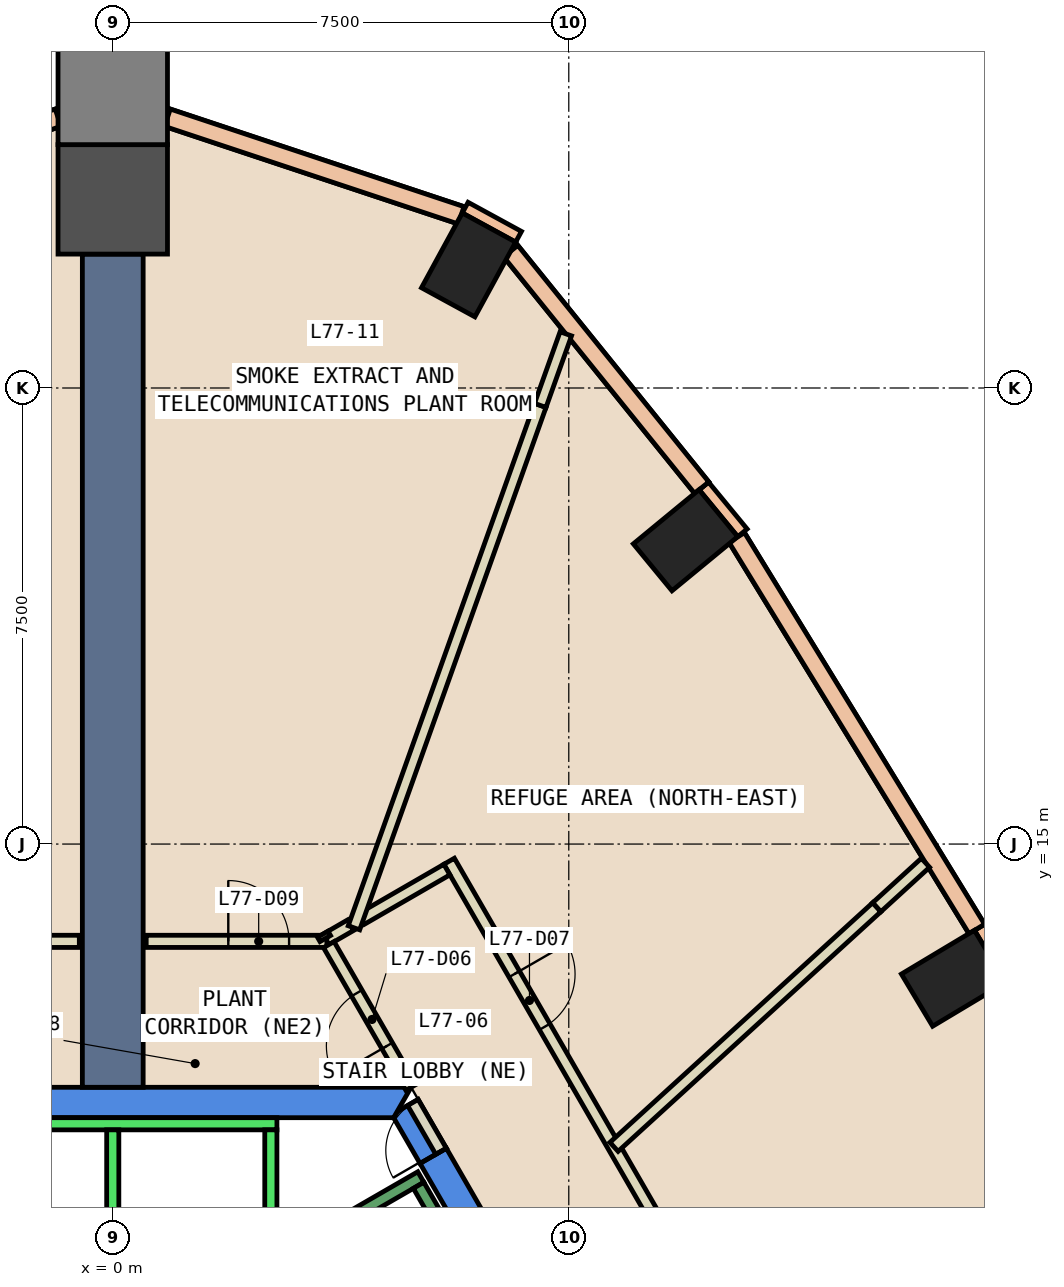
"""IFC4 building model, lengths in metres.
Left out: names, types, materials, properties, quantities, classifications, styles, units other than length and angle.
Written with IfcOpenShell. Run it as: python <this file> out.ifc"""

import sys

from ifc_helpers import new_model, si_unit, direction, frame, frame_2d, origin, origin_2d, place, context, subcontext, project, spatial, polyline, rectangle, outline, extrude, element, fill, save


model = new_model("IFC4")
c1 = context("Model", 3, precision=1e-05, world=origin(), true_north=direction((0.0, 1.0)))
c2 = subcontext(c1, "Body", "Model", "MODEL_VIEW")
j1 = project(units=[si_unit("LENGTHUNIT", "METRE"), si_unit("PLANEANGLEUNIT", "RADIAN")], contexts=[c1])
p1 = place(None, origin())
s1 = spatial("IfcSite", under=j1, at=p1, CompositionType="ELEMENT")
p2 = place(p1, origin())
s2 = spatial("IfcBuilding", under=s1, at=p2, CompositionType="ELEMENT")
p3 = place(p2, frame((0.0, 0.0, 326.0)))
s3 = spatial("IfcBuildingStorey", under=s2, at=p3, CompositionType="ELEMENT", Elevation=326.0)
for number, where, z_axis, x_axis in (
    (1, (13.828, 12.793, -0.6), (0.0, 0.0, 1.0), (-0.514, 0.858, 0.0)),
    (2, (9.42, 19.996, -0.6), (0.0, 0.0, 1.0), (-0.636, 0.772, 0.0)),
    (3, (5.852, 24.524, -0.6), (0.0, 0.0, 1.0), (-0.878, 0.479, 0.0)),
):
    element("IfcColumn", number, at=place(p3, frame(where, z_axis=z_axis, x_axis=x_axis)), inside=s3, PredefinedType="COLUMN", context=c2, shape_type="SweptSolid", body=[
        extrude(rectangle(XDim=1.0, YDim=1.4, at=origin_2d()), origin(), (0.0, 0.0, 1.0), 5.55),
    ])
for number, where, z_axis, x_axis in (
    (4, (0.0, 25.602, -0.6), (0.0, 0.0, 1.0), (0.0, 1.0, 0.0)),
    (5, (0.0, 27.402, -0.6), (0.0, 0.0, 1.0), (0.0, 1.0, 0.0)),
):
    element("IfcColumn", number, at=place(p3, frame(where, z_axis=z_axis, x_axis=x_axis)), inside=s3, PredefinedType="COLUMN", context=c2, shape_type="SweptSolid", body=[
        extrude(rectangle(XDim=1.8, YDim=1.8, at=origin_2d()), origin(), (0.0, 0.0, 1.0), 5.55),
    ])
p4 = place(p3, frame((0.0, 0.0, -0.6)))
e6 = element("IfcWall", 6, at=p4, inside=s3, PredefinedType="SHEAR", context=c2, shape_type="SweptSolid", body=[
    extrude(outline(polyline([(5.486, 9.998), (5.053, 9.748), (9.238, 2.5), (9.815, 2.5), (5.486, 9.998)])), origin(), (0.0, 0.0, 1.0), 5.55),
])
p5 = place(p3, frame((0.0, 0.0, 3.6)))
e7 = element("IfcWall", 7, at=p5, inside=s3, PredefinedType="SHEAR", context=c2, shape_type="SweptSolid", body=[
    extrude(outline(polyline([(5.022, 10.8), (4.677, 10.601), (4.619, 10.5), (5.053, 9.748), (5.486, 9.998), (5.022, 10.8)])), origin(), (0.0, 0.0, 1.0), 1.35),
])
p6 = place(p3, frame((0.0, 0.0, -0.6)))
e8 = element("IfcWall", 8, at=p6, inside=s3, PredefinedType="SHEAR", context=c2, shape_type="SweptSolid", body=[
    extrude(outline(polyline([(4.907, 11.0), (-4.907, 11.0), (-4.619, 10.5), (4.619, 10.5), (4.907, 11.0)])), origin(), (0.0, 0.0, 1.0), 5.55),
])
p7 = place(p3, frame((0.0, 11.0, 0.0), z_axis=(0.0, 0.0, 1.0), x_axis=(0.0, 1.0, 0.0)))
e9 = element("IfcWall", 9, at=p7, inside=s3, PredefinedType="SHEAR", context=c2, shape_type="SweptSolid", body=[
    extrude(rectangle(XDim=13.702, YDim=1.0, at=frame_2d((6.851, 0.0))), origin(), (0.0, 0.0, 1.0), 4.95),
])
for number, where, z_axis, x_axis in (
    (10, (6.674, 24.987, 0.0), (0.0, 0.0, 1.0), (-0.878, 0.479, 0.0)),
    (11, (14.771, 12.776, 0.0), (0.0, 0.0, 1.0), (-0.514, 0.858, 0.0)),
    (12, (10.356, 20.118, 0.0), (0.0, 0.0, 1.0), (-0.636, 0.772, 0.0)),
):
    element("IfcWall", number, at=place(p3, frame(where, z_axis=z_axis, x_axis=x_axis)), inside=s3, PredefinedType="STANDARD", context=c2, shape_type="SweptSolid", body=[
        extrude(rectangle(XDim=1.0, YDim=0.2, at=frame_2d((0.5, 0.0))), origin(), (0.0, 0.0, 1.0), 4.95),
    ])
p8 = place(p3, frame((14.21, 13.604, 0.0), z_axis=(0.0, 0.0, 1.0), x_axis=(-0.522767476235, 0.852475316822, 0.0)))
e13 = element("IfcWall", 13, at=p8, inside=s3, PredefinedType="STANDARD", context=c2, shape_type="SweptSolid", body=[
    extrude(rectangle(XDim=7.552, YDim=0.3, at=frame_2d((3.776, 0.0))), origin(), (0.0, 0.0, 1.0), 1.2),
])
p9 = place(p3, frame((14.21, 13.604, 4.15), z_axis=(0.0, 0.0, 1.0), x_axis=(-0.522767476235, 0.852475316822, 0.0)))
e14 = element("IfcWall", 14, at=p9, inside=s3, PredefinedType="STANDARD", context=c2, shape_type="SweptSolid", body=[
    extrude(rectangle(XDim=7.552, YDim=0.3, at=frame_2d((3.776, 0.0))), origin(), (0.0, 0.0, 1.0), 0.8),
])
p10 = place(p3, frame((9.686, 20.861, 0.0), z_axis=(0.0, 0.0, 1.0), x_axis=(-0.628249584672, 0.778011863251, 0.0)))
e15 = element("IfcWall", 15, at=p10, inside=s3, PredefinedType="STANDARD", context=c2, shape_type="SweptSolid", body=[
    extrude(rectangle(XDim=5.0, YDim=0.3, at=frame_2d((2.5, 0.0))), origin(), (0.0, 0.0, 1.0), 1.2),
])
p11 = place(p3, frame((9.686, 20.861, 4.15), z_axis=(0.0, 0.0, 1.0), x_axis=(-0.628249584672, 0.778011863251, 0.0)))
e16 = element("IfcWall", 16, at=p11, inside=s3, PredefinedType="STANDARD", context=c2, shape_type="SweptSolid", body=[
    extrude(rectangle(XDim=5.0, YDim=0.3, at=frame_2d((2.5, 0.0))), origin(), (0.0, 0.0, 1.0), 0.8),
])
p12 = place(p3, frame((5.729, 25.34, 0.0), z_axis=(0.0, 0.0, 1.0), x_axis=(-0.948980274282, 0.315335438897, 0.0)))
e17 = element("IfcWall", 17, at=p12, inside=s3, PredefinedType="STANDARD", context=c2, shape_type="SweptSolid", body=[
    extrude(rectangle(XDim=5.09, YDim=0.3, at=frame_2d((2.545, 0.0))), origin(), (0.0, 0.0, 1.0), 1.2),
])
p13 = place(p3, frame((5.729, 25.34, 4.15), z_axis=(0.0, 0.0, 1.0), x_axis=(-0.948980274282, 0.315335438897, 0.0)))
e18 = element("IfcWall", 18, at=p13, inside=s3, PredefinedType="STANDARD", context=c2, shape_type="SweptSolid", body=[
    extrude(rectangle(XDim=5.09, YDim=0.3, at=frame_2d((2.545, 0.0))), origin(), (0.0, 0.0, 1.0), 0.8),
])
p14 = place(p3, frame((-0.899, 26.945, 0.0), z_axis=(0.0, 0.0, 1.0), x_axis=(-0.948980274282, -0.315335438897, 0.0)))
e19 = element("IfcWall", 19, at=p14, inside=s3, PredefinedType="STANDARD", context=c2, shape_type="SweptSolid", body=[
    extrude(rectangle(XDim=5.09, YDim=0.3, at=frame_2d((2.545, 0.0))), origin(), (0.0, 0.0, 1.0), 1.2),
])
p15 = place(p3, frame((-0.899, 26.945, 4.15), z_axis=(0.0, 0.0, 1.0), x_axis=(-0.948980274282, -0.315335438897, 0.0)))
e20 = element("IfcWall", 20, at=p15, inside=s3, PredefinedType="STANDARD", context=c2, shape_type="SweptSolid", body=[
    extrude(rectangle(XDim=5.09, YDim=0.3, at=frame_2d((2.545, 0.0))), origin(), (0.0, 0.0, 1.0), 0.8),
])
p16 = place(p3, frame((4.907, 11.0, 0.0), z_axis=(0.0, 0.0, 1.0), x_axis=(-0.5004692653, 0.865754303766, 0.0)))
e21 = element("IfcWall", 21, at=p16, inside=s3, PredefinedType="PARTITIONING", context=c2, shape_type="SweptSolid", body=[
    extrude(rectangle(XDim=0.17, YDim=0.2, at=frame_2d((0.085, 0.0))), origin(), (0.0, 0.0, 1.0), 2.4),
])
p17 = place(p3, frame((5.532, 14.717, 0.0), z_axis=(0.0, 0.0, 1.0), x_axis=(0.499968011863, -0.866043871356, 0.0)))
e22 = element("IfcWall", 22, at=p17, inside=s3, PredefinedType="PARTITIONING", context=c2, shape_type="SweptSolid", body=[
    extrude(rectangle(XDim=7.201, YDim=0.2, at=frame_2d((3.6, 0.0))), origin(), (0.0, 0.0, 1.0), 4.95),
])
p18 = place(p17, frame((2.143, 0.0, 0.0)))
e23 = element("IfcOpeningElement", 23, at=p18, cuts=e22, PredefinedType="OPENING", context=c2, shape_type="SweptSolid", body=[
    extrude(rectangle(XDim=1.0, YDim=2.1, at=frame_2d((0.5, 1.05))), frame((0.0, 0.11, 0.0), z_axis=(0.0, -1.0, 0.0), x_axis=(1.0, 0.0, 0.0)), (0.0, 0.0, 1.0), 0.22),
])
p19 = place(p3, frame((4.088, 13.767, 0.0), z_axis=(0.0, 0.0, 1.0), x_axis=(0.865885317322, 0.500242558411, 0.0)))
e24 = element("IfcWall", 24, at=p19, inside=s3, PredefinedType="PARTITIONING", context=c2, shape_type="SweptSolid", body=[
    extrude(rectangle(XDim=1.625, YDim=0.2, at=frame_2d((0.812, 0.0))), origin(), (0.0, 0.0, 1.0), 4.95),
])
p20 = place(p3, frame((3.504, 13.43, 0.0), z_axis=(0.0, 0.0, 1.0), x_axis=(0.865790651554, 0.500406382535, 0.0)))
e25 = element("IfcWall", 25, at=p20, inside=s3, PredefinedType="PARTITIONING", context=c2, shape_type="SweptSolid", body=[
    extrude(rectangle(XDim=0.474, YDim=0.2, at=frame_2d((0.237, 0.0))), origin(), (0.0, 0.0, 1.0), 2.55),
])
p21 = place(p3, frame((0.55, 13.4, 0.0), z_axis=(0.0, 0.0, 1.0), x_axis=(1.0, 0.0, 0.0)))
e26 = element("IfcWall", 26, at=p21, inside=s3, PredefinedType="PARTITIONING", context=c2, shape_type="SweptSolid", body=[
    extrude(rectangle(XDim=2.971, YDim=0.2, at=frame_2d((1.485, 0.0))), origin(), (0.0, 0.0, 1.0), 4.95),
])
p22 = place(p21, frame((1.35, 0.0, 0.0)))
e27 = element("IfcOpeningElement", 27, at=p22, cuts=e26, PredefinedType="OPENING", context=c2, shape_type="SweptSolid", body=[
    extrude(rectangle(XDim=1.0, YDim=2.1, at=frame_2d((0.5, 1.05))), frame((0.0, 0.11, 0.0), z_axis=(0.0, -1.0, 0.0), x_axis=(1.0, 0.0, 0.0)), (0.0, 0.0, 1.0), 0.22),
])
p23 = place(p3, frame((13.366, 14.692, 0.0), z_axis=(0.0, 0.0, 1.0), x_axis=(-0.738636380762, -0.67410406987, 0.0)))
e28 = element("IfcWall", 28, at=p23, inside=s3, PredefinedType="PARTITIONING", context=c2, shape_type="SweptSolid", body=[
    extrude(rectangle(XDim=1.086, YDim=0.2, at=frame_2d((0.543, 0.0))), origin(), (0.0, 0.0, 1.0), 2.55),
])
p24 = place(p3, frame((3.967, 13.623, 0.0), z_axis=(0.0, 0.0, 1.0), x_axis=(0.33592093682, 0.941890186914, 0.0)))
e29 = element("IfcWall", 29, at=p24, inside=s3, PredefinedType="PARTITIONING", context=c2, shape_type="SweptSolid", body=[
    extrude(rectangle(XDim=9.121, YDim=0.2, at=frame_2d((4.561, 0.0))), origin(), (0.0, 0.0, 1.0), 4.95),
])
p25 = place(p3, frame((0.0, 26.522, 0.0), z_axis=(0.0, 0.0, 1.0), x_axis=(0.0, 1.0, 0.0)))
e30 = element("IfcWall", 30, at=p25, inside=s3, PredefinedType="PARTITIONING", context=c2, shape_type="SweptSolid", body=[
    extrude(rectangle(XDim=0.501, YDim=0.2, at=frame_2d((0.25, 0.0))), origin(), (0.0, 0.0, 1.0), 4.95),
])
p26 = place(p3, frame((5.399, 9.948, 0.0), z_axis=(0.0, 0.0, 1.0), x_axis=(-0.499882215713, 0.866093395895, 0.0)))
e31 = element("IfcWall", 31, at=p26, inside=s3, PredefinedType="PARTITIONING", context=c2, shape_type="SweptSolid", body=[
    extrude(rectangle(XDim=0.926, YDim=0.2, at=frame_2d((0.463, 0.0))), origin(), (0.0, 0.0, 1.0), 2.4),
])
p27 = place(p26, frame((0.017, 0.0, 0.0)))
e32 = element("IfcOpeningElement", 32, at=p27, cuts=e31, PredefinedType="OPENING", context=c2, shape_type="SweptSolid", body=[
    extrude(rectangle(XDim=0.9, YDim=2.1, at=frame_2d((0.45, 1.05))), frame((0.0, 0.11, 0.0), z_axis=(0.0, -1.0, 0.0), x_axis=(1.0, 0.0, 0.0)), (0.0, 0.0, 1.0), 0.22),
])
p28 = place(p3, frame((4.822, 11.147, 0.0), z_axis=(0.0, 0.0, 1.0), x_axis=(-0.499841768758, 0.866116739363, 0.0)))
e33 = element("IfcWall", 33, at=p28, inside=s3, PredefinedType="PARTITIONING", context=c2, shape_type="SweptSolid", body=[
    extrude(rectangle(XDim=2.539, YDim=0.2, at=frame_2d((1.27, 0.0))), origin(), (0.0, 0.0, 1.0), 4.95),
])
p29 = place(p28, frame((0.618, 0.0, 0.0)))
e34 = element("IfcOpeningElement", 34, at=p29, cuts=e33, PredefinedType="OPENING", context=c2, shape_type="SweptSolid", body=[
    extrude(rectangle(XDim=1.0, YDim=2.1, at=frame_2d((0.5, 1.05))), frame((0.0, 0.11, 0.0), z_axis=(0.0, -1.0, 0.0), x_axis=(1.0, 0.0, 0.0)), (0.0, 0.0, 1.0), 0.22),
])
p30 = place(p3, frame((3.495, 13.446, 0.0), z_axis=(0.0, 0.0, 1.0), x_axis=(-0.499980071345, 0.866036909293, 0.0)))
e35 = element("IfcWall", 35, at=p30, inside=s3, PredefinedType="PARTITIONING", context=c2, shape_type="SweptSolid", body=[
    extrude(rectangle(XDim=0.082, YDim=0.2, at=frame_2d((0.041, 0.0))), origin(), (0.0, 0.0, 1.0), 2.55),
])
p31 = place(p3, frame((12.564, 13.96, 0.0), z_axis=(0.0, 0.0, 1.0), x_axis=(-0.738865955228, -0.673852432069, 0.0)))
e36 = element("IfcWall", 36, at=p31, inside=s3, PredefinedType="PARTITIONING", context=c2, shape_type="SweptSolid", body=[
    extrude(rectangle(XDim=5.847, YDim=0.2, at=frame_2d((2.923, 0.0))), origin(), (0.0, 0.0, 1.0), 4.95),
])
p32 = place(p3, frame((7.031, 22.214, 0.0), z_axis=(0.0, 0.0, 1.0), x_axis=(0.336026978019, 0.941852361065, 0.0)))
e37 = element("IfcWall", 37, at=p32, inside=s3, PredefinedType="PARTITIONING", context=c2, shape_type="SweptSolid", body=[
    extrude(rectangle(XDim=1.25, YDim=0.2, at=frame_2d((0.625, 0.0))), origin(), (0.0, 0.0, 1.0), 2.55),
])
p33 = place(p3, frame((-2.533, 13.4, 0.0), z_axis=(0.0, 0.0, 1.0), x_axis=(1.0, 0.0, 0.0)))
e38 = element("IfcWall", 38, at=p33, inside=s3, PredefinedType="PARTITIONING", context=c2, shape_type="SweptSolid", body=[
    extrude(rectangle(XDim=1.983, YDim=0.2, at=frame_2d((0.991, 0.0))), origin(), (0.0, 0.0, 1.0), 4.95),
])
p34 = place(p3, frame((2.7, 10.4, 0.0), z_axis=(0.0, 0.0, 1.0), x_axis=(-1.0, 0.0, 0.0)))
e39 = element("IfcWall", 39, at=p34, inside=s3, PredefinedType="STANDARD", context=c2, shape_type="SweptSolid", body=[
    extrude(rectangle(XDim=5.4, YDim=0.2, at=frame_2d((2.7, 0.0))), origin(), (0.0, 0.0, 1.0), 4.95),
])
for number, where, z_axis, x_axis in (
    (40, (2.6, 7.9, 0.0), (0.0, 0.0, 1.0), (0.0, 1.0, 0.0)),
    (41, (0.0, 7.9, 0.0), (0.0, 0.0, 1.0), (0.0, 1.0, 0.0)),
):
    element("IfcWall", number, at=place(p3, frame(where, z_axis=z_axis, x_axis=x_axis)), inside=s3, PredefinedType="STANDARD", context=c2, shape_type="SweptSolid", body=[
        extrude(rectangle(XDim=2.4, YDim=0.2, at=frame_2d((1.2, 0.0))), origin(), (0.0, 0.0, 1.0), 4.95),
    ])
p35 = place(p3, frame((2.7, 8.158, 0.0), z_axis=(0.0, 0.0, 1.0), x_axis=(0.86611865017, 0.499838457731, 0.0)))
e42 = element("IfcWall", 42, at=p35, inside=s3, PredefinedType="STANDARD", context=c2, shape_type="SweptSolid", body=[
    extrude(rectangle(XDim=2.733, YDim=0.2, at=frame_2d((1.366, 0.0))), origin(), (0.0, 0.0, 1.0), 4.95),
])
p36 = place(p3, frame((8.48, 3.412, 0.0), z_axis=(0.0, 0.0, 1.0), x_axis=(-0.499978703459, 0.866037698999, 0.0)))
e43 = element("IfcWall", 43, at=p36, inside=s3, PredefinedType="STANDARD", context=c2, shape_type="SweptSolid", body=[
    extrude(rectangle(XDim=6.9, YDim=0.2, at=frame_2d((3.45, 0.0))), origin(), (0.0, 0.0, 1.0), 4.95),
])
p37 = place(p29, origin())
e44 = element("IfcDoor", 44, at=p37, inside=s3, OperationType="SINGLE_SWING_RIGHT", PredefinedType="DOOR", context=c2, shape_type="SweptSolid", body=[
    extrude(rectangle(XDim=1.0, YDim=2.1, at=frame_2d((0.5, 1.05))), frame((0.0, 0.025, 0.0), z_axis=(0.0, -1.0, 0.0), x_axis=(1.0, 0.0, 0.0)), (0.0, 0.0, 1.0), 0.05),
])
fill(e34, e44)
p38 = place(p18, origin())
e45 = element("IfcDoor", 45, at=p38, inside=s3, OperationType="SINGLE_SWING_LEFT", PredefinedType="DOOR", context=c2, shape_type="SweptSolid", body=[
    extrude(rectangle(XDim=1.0, YDim=2.1, at=frame_2d((0.5, 1.05))), frame((0.0, 0.025, 0.0), z_axis=(0.0, -1.0, 0.0), x_axis=(1.0, 0.0, 0.0)), (0.0, 0.0, 1.0), 0.05),
])
fill(e23, e45)
p39 = place(p22, origin())
e46 = element("IfcDoor", 46, at=p39, inside=s3, OperationType="SINGLE_SWING_LEFT", PredefinedType="DOOR", context=c2, shape_type="SweptSolid", body=[
    extrude(rectangle(XDim=1.0, YDim=2.1, at=frame_2d((0.5, 1.05))), frame((0.0, 0.025, 0.0), z_axis=(0.0, -1.0, 0.0), x_axis=(1.0, 0.0, 0.0)), (0.0, 0.0, 1.0), 0.05),
])
fill(e27, e46)
p40 = place(p27, origin())
e47 = element("IfcDoor", 47, at=p40, inside=s3, OperationType="SINGLE_SWING_LEFT", PredefinedType="DOOR", context=c2, shape_type="SweptSolid", body=[
    extrude(rectangle(XDim=0.9, YDim=2.1, at=frame_2d((0.45, 1.05))), frame((0.0, 0.025, 0.0), z_axis=(0.0, -1.0, 0.0), x_axis=(1.0, 0.0, 0.0)), (0.0, 0.0, 1.0), 0.05),
])
fill(e32, e47)
save(model, sys.argv[1])
